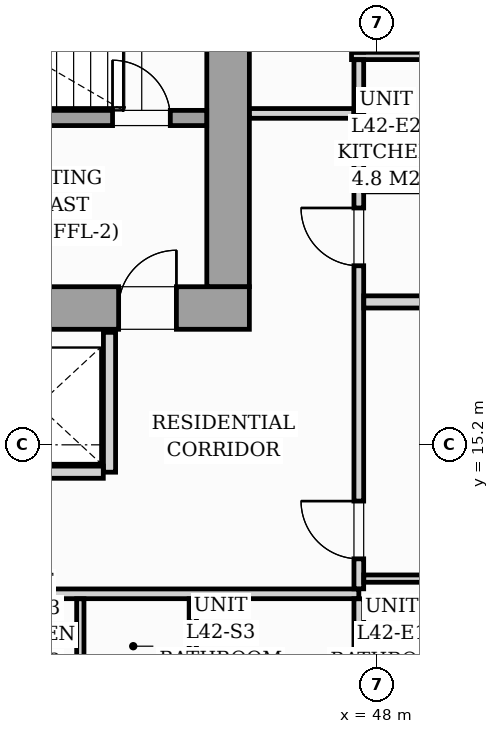
"""IFC4 building model, lengths in metres.
Left out: names, types, materials, properties, quantities, classifications, styles, units other than length and angle.
Written with IfcOpenShell. Run it as: python <this file> out.ifc"""

import sys

from ifc_helpers import new_model, si_unit, direction, frame, frame_2d, origin, origin_2d, place, context, subcontext, project, spatial, rectangle, i_section, extrude, source, transform, mapped, element, fill, save


model = new_model("IFC4")
c1 = context("Model", 3, precision=1e-05, world=origin(), true_north=direction((0.0, 1.0)))
c2 = subcontext(c1, "Body", "Model", "MODEL_VIEW")
j1 = project(units=[si_unit("LENGTHUNIT", "METRE"), si_unit("PLANEANGLEUNIT", "RADIAN")], contexts=[c1])
p1 = place(None, origin())
s1 = spatial("IfcSite", under=j1, at=p1, CompositionType="ELEMENT")
p2 = place(p1, origin())
s2 = spatial("IfcBuilding", under=s1, at=p2, CompositionType="ELEMENT")
p3 = place(p2, frame((0.0, 0.0, 147.0)))
s3 = spatial("IfcBuildingStorey", under=s2, at=p3, CompositionType="ELEMENT", Elevation=147.0)
m1 = source(origin(), c2, "Body", "SweptSolid", [
    extrude(i_section(OverallWidth=0.421, OverallDepth=0.465, WebThickness=0.045, FlangeThickness=0.073, FilletRadius=0.018, at=origin_2d()), origin(), (0.0, 0.0, 1.0), 3.196),
])
p4 = place(p3, frame((45.6, 17.4, 0.002), z_axis=(0.0, 0.0, 1.0), x_axis=(1.0, 0.0, 0.0)))
e1 = element("IfcColumn", 1, at=p4, inside=s3, PredefinedType="PILASTER", context=c2, shape_type="MappedRepresentation", body=[
    mapped(m1, transform((0.0, 0.0, 0.0), scale=1.0)),
])
p5 = place(p3, frame((26.1, 17.45, 0.0), z_axis=(0.0, 0.0, 1.0), x_axis=(1.0, 0.0, 0.0)))
e2 = element("IfcWall", 2, at=p5, inside=s3, PredefinedType="SHEAR", context=c2, shape_type="SweptSolid", body=[
    extrude(rectangle(XDim=19.8, YDim=0.7, at=frame_2d((9.9, 0.0))), origin(), (0.0, 0.0, 1.0), 3.2),
])
p6 = place(p5, frame((1.05, 0.0, 0.0)))
e3 = element("IfcOpeningElement", 3, at=p6, cuts=e2, PredefinedType="OPENING", context=c2, shape_type="SweptSolid", body=[
    extrude(rectangle(XDim=0.95, YDim=2.06, at=frame_2d((0.475, 1.03))), frame((0.0, 0.36, 0.0), z_axis=(0.0, -1.0, 0.0), x_axis=(1.0, 0.0, 0.0)), (0.0, 0.0, 1.0), 0.72),
])
p7 = place(p5, frame((9.48, 0.0, 0.0)))
e4 = element("IfcOpeningElement", 4, at=p7, cuts=e2, PredefinedType="OPENING", context=c2, shape_type="SweptSolid", body=[
    extrude(rectangle(XDim=0.85, YDim=2.0, at=frame_2d((0.425, 1.0))), frame((0.0, 0.36, 0.0), z_axis=(0.0, -1.0, 0.0), x_axis=(1.0, 0.0, 0.0)), (0.0, 0.0, 1.0), 0.72),
])
p8 = place(p5, frame((17.65, 0.0, 0.0)))
e5 = element("IfcOpeningElement", 5, at=p8, cuts=e2, PredefinedType="OPENING", context=c2, shape_type="SweptSolid", body=[
    extrude(rectangle(XDim=0.95, YDim=2.06, at=frame_2d((0.475, 1.03))), frame((0.0, 0.36, 0.0), z_axis=(0.0, -1.0, 0.0), x_axis=(1.0, 0.0, 0.0)), (0.0, 0.0, 1.0), 0.72),
])
p9 = place(p3, frame((45.55, 17.802, 0.0), z_axis=(0.0, 0.0, 1.0), x_axis=(0.0, 1.0, 0.0)))
e6 = element("IfcWall", 6, at=p9, inside=s3, PredefinedType="SHEAR", context=c2, shape_type="SweptSolid", body=[
    extrude(rectangle(XDim=5.796, YDim=0.7, at=frame_2d((2.898, 0.0))), origin(), (0.0, 0.0, 1.0), 3.2),
])
p10 = place(p3, frame((37.05, 20.575, 0.0), z_axis=(0.0, 0.0, 1.0), x_axis=(1.0, 0.0, 0.0)))
e7 = element("IfcWall", 7, at=p10, inside=s3, PredefinedType="SOLIDWALL", context=c2, shape_type="SweptSolid", body=[
    extrude(rectangle(XDim=8.148, YDim=0.25, at=frame_2d((4.074, 0.0))), origin(), (0.0, 0.0, 1.0), 3.2),
])
p11 = place(p10, frame((6.6, 0.0, 0.0)))
e8 = element("IfcOpeningElement", 8, at=p11, cuts=e7, PredefinedType="OPENING", context=c2, shape_type="SweptSolid", body=[
    extrude(rectangle(XDim=0.95, YDim=2.06, at=frame_2d((0.475, 1.03))), frame((0.0, 0.135, 0.0), z_axis=(0.0, -1.0, 0.0), x_axis=(1.0, 0.0, 0.0)), (0.0, 0.0, 1.0), 0.27),
])
p12 = place(p3, frame((43.6, 14.75, 0.0), z_axis=(0.0, 0.0, 1.0), x_axis=(0.0, 1.0, 0.0)))
e9 = element("IfcWall", 9, at=p12, inside=s3, PredefinedType="PARTITIONING", context=c2, shape_type="SweptSolid", body=[
    extrude(rectangle(XDim=2.3, YDim=0.2, at=frame_2d((1.15, 0.0))), origin(), (0.0, 0.0, 1.0), 2.94),
])
p13 = place(p3, frame((41.352, 14.75, 0.0), z_axis=(0.0, 0.0, 1.0), x_axis=(1.0, 0.0, 0.0)))
e10 = element("IfcWall", 10, at=p13, inside=s3, PredefinedType="PARTITIONING", context=c2, shape_type="SweptSolid", body=[
    extrude(rectangle(XDim=2.146, YDim=0.2, at=frame_2d((1.073, 0.0))), origin(), (0.0, 0.0, 1.0), 2.94),
])
p14 = place(p3, frame((22.05, 12.75, 0.0), z_axis=(0.0, 0.0, 1.0), x_axis=(1.0, 0.0, 0.0)))
e11 = element("IfcWall", 11, at=p14, inside=s3, PredefinedType="PARTITIONING", context=c2, shape_type="SweptSolid", body=[
    extrude(rectangle(XDim=25.65, YDim=0.16, at=frame_2d((12.825, 0.0))), origin(), (0.0, 0.0, 1.0), 2.94),
])
p15 = place(p14, frame((1.312, 0.0, 0.0)))
e12 = element("IfcOpeningElement", 12, at=p15, cuts=e11, PredefinedType="OPENING", context=c2, shape_type="SweptSolid", body=[
    extrude(rectangle(XDim=0.95, YDim=2.06, at=frame_2d((0.475, 1.03))), frame((0.0, 0.09, 0.0), z_axis=(0.0, -1.0, 0.0), x_axis=(1.0, 0.0, 0.0)), (0.0, 0.0, 1.0), 0.18),
])
p16 = place(p14, frame((8.281, 0.0, 0.0)))
e13 = element("IfcOpeningElement", 13, at=p16, cuts=e11, PredefinedType="OPENING", context=c2, shape_type="SweptSolid", body=[
    extrude(rectangle(XDim=0.95, YDim=2.06, at=frame_2d((0.475, 1.03))), frame((0.0, 0.09, 0.0), z_axis=(0.0, -1.0, 0.0), x_axis=(1.0, 0.0, 0.0)), (0.0, 0.0, 1.0), 0.18),
])
p17 = place(p14, frame((17.268, 0.0, 0.0)))
e14 = element("IfcOpeningElement", 14, at=p17, cuts=e11, PredefinedType="OPENING", context=c2, shape_type="SweptSolid", body=[
    extrude(rectangle(XDim=0.95, YDim=2.06, at=frame_2d((0.475, 1.03))), frame((0.0, 0.09, 0.0), z_axis=(0.0, -1.0, 0.0), x_axis=(1.0, 0.0, 0.0)), (0.0, 0.0, 1.0), 0.18),
])
p18 = place(p3, frame((47.7, 5.783, 0.0), z_axis=(0.0, 0.0, 1.0), x_axis=(0.0, 1.0, 0.0)))
e15 = element("IfcWall", 15, at=p18, inside=s3, PredefinedType="PARTITIONING", context=c2, shape_type="SweptSolid", body=[
    extrude(rectangle(XDim=6.885, YDim=0.16, at=frame_2d((3.442, 0.0))), origin(), (0.0, 0.0, 1.0), 2.94),
])
p19 = place(p3, frame((47.7, 12.832, 0.0), z_axis=(0.0, 0.0, 1.0), x_axis=(0.0, 1.0, 0.0)))
e16 = element("IfcWall", 16, at=p19, inside=s3, PredefinedType="PARTITIONING", context=c2, shape_type="SweptSolid", body=[
    extrude(rectangle(XDim=7.818, YDim=0.16, at=frame_2d((3.909, 0.0))), origin(), (0.0, 0.0, 1.0), 2.94),
])
p20 = place(p19, frame((0.493, 0.0, 0.0)))
e17 = element("IfcOpeningElement", 17, at=p20, cuts=e16, PredefinedType="OPENING", context=c2, shape_type="SweptSolid", body=[
    extrude(rectangle(XDim=0.95, YDim=2.06, at=frame_2d((0.475, 1.03))), frame((0.0, 0.09, 0.0), z_axis=(0.0, -1.0, 0.0), x_axis=(1.0, 0.0, 0.0)), (0.0, 0.0, 1.0), 0.18),
])
p21 = place(p19, frame((5.313, 0.0, 0.0)))
e18 = element("IfcOpeningElement", 18, at=p21, cuts=e16, PredefinedType="OPENING", context=c2, shape_type="SweptSolid", body=[
    extrude(rectangle(XDim=0.95, YDim=2.06, at=frame_2d((0.475, 1.03))), frame((0.0, 0.09, 0.0), z_axis=(0.0, -1.0, 0.0), x_axis=(1.0, 0.0, 0.0)), (0.0, 0.0, 1.0), 0.18),
])
p22 = place(p3, frame((45.902, 20.65, 0.0), z_axis=(0.0, 0.0, 1.0), x_axis=(1.0, 0.0, 0.0)))
e19 = element("IfcWall", 19, at=p22, inside=s3, PredefinedType="PARTITIONING", context=c2, shape_type="SweptSolid", body=[
    extrude(rectangle(XDim=1.716, YDim=0.16, at=frame_2d((0.858, 0.0))), origin(), (0.0, 0.0, 1.0), 2.94),
])
p23 = place(p3, frame((44.97, 6.046, 0.0), z_axis=(0.0, 0.0, 1.0), x_axis=(0.0, 1.0, 0.0)))
e20 = element("IfcWall", 20, at=p23, inside=s3, PredefinedType="PARTITIONING", context=c2, shape_type="SweptSolid", body=[
    extrude(rectangle(XDim=6.622, YDim=0.12, at=frame_2d((3.311, 0.0))), origin(), (0.0, 0.0, 1.0), 2.94),
])
p24 = place(p23, frame((3.354, 0.0, 0.0)))
e21 = element("IfcOpeningElement", 21, at=p24, cuts=e20, PredefinedType="OPENING", context=c2, shape_type="SweptSolid", body=[
    extrude(rectangle(XDim=0.9, YDim=2.05, at=frame_2d((0.45, 1.025))), frame((0.0, 0.07, 0.0), z_axis=(0.0, -1.0, 0.0), x_axis=(1.0, 0.0, 0.0)), (0.0, 0.0, 1.0), 0.14),
])
p25 = place(p3, frame((43.12, 10.562, 0.0), z_axis=(0.0, 0.0, 1.0), x_axis=(0.0, 1.0, 0.0)))
e22 = element("IfcWall", 22, at=p25, inside=s3, PredefinedType="PARTITIONING", context=c2, shape_type="SweptSolid", body=[
    extrude(rectangle(XDim=2.106, YDim=0.12, at=frame_2d((1.053, 0.0))), origin(), (0.0, 0.0, 1.0), 2.94),
])
p26 = place(p3, frame((47.782, 17.55, 0.0), z_axis=(0.0, 0.0, 1.0), x_axis=(1.0, 0.0, 0.0)))
e23 = element("IfcWall", 23, at=p26, inside=s3, PredefinedType="PARTITIONING", context=c2, shape_type="SweptSolid", body=[
    extrude(rectangle(XDim=11.934, YDim=0.2, at=frame_2d((5.967, 0.0))), origin(), (0.0, 0.0, 1.0), 2.94),
])
p27 = place(p3, frame((47.782, 13.0, 0.0), z_axis=(0.0, 0.0, 1.0), x_axis=(1.0, 0.0, 0.0)))
e24 = element("IfcWall", 24, at=p27, inside=s3, PredefinedType="PARTITIONING", context=c2, shape_type="SweptSolid", body=[
    extrude(rectangle(XDim=2.256, YDim=0.12, at=frame_2d((1.128, 0.0))), origin(), (0.0, 0.0, 1.0), 2.94),
])
p28 = place(p3, frame((47.58, 21.595, 0.0), z_axis=(0.0, 0.0, 1.0), x_axis=(1.0, 0.0, 0.0)))
e25 = element("IfcWall", 25, at=p28, inside=s3, PredefinedType="PARTITIONING", context=c2, shape_type="SweptSolid", body=[
    extrude(rectangle(XDim=2.458, YDim=0.12, at=frame_2d((1.229, 0.0))), origin(), (0.0, 0.0, 1.0), 2.94),
])
p29 = place(p3, frame((47.782, 19.42, 0.0), z_axis=(0.0, 0.0, 1.0), x_axis=(1.0, 0.0, 0.0)))
e26 = element("IfcWall", 26, at=p29, inside=s3, PredefinedType="PARTITIONING", context=c2, shape_type="SweptSolid", body=[
    extrude(rectangle(XDim=2.256, YDim=0.12, at=frame_2d((1.128, 0.0))), origin(), (0.0, 0.0, 1.0), 2.94),
])
p30 = place(p3, frame((47.7, 20.65, 0.0), z_axis=(0.0, 0.0, 1.0), x_axis=(0.0, 1.0, 0.0)))
e27 = element("IfcWall", 27, at=p30, inside=s3, PredefinedType="PARTITIONING", context=c2, shape_type="SweptSolid", body=[
    extrude(rectangle(XDim=0.883, YDim=0.16, at=frame_2d((0.441, 0.0))), origin(), (0.0, 0.0, 1.0), 2.94),
])
m2 = source(origin(), c2, "Body", "SweptSolid", [
    extrude(rectangle(XDim=0.95, YDim=2.06, at=frame_2d((0.475, 1.03))), frame((0.0, 0.025, 0.0), z_axis=(0.0, -1.0, 0.0), x_axis=(1.0, 0.0, 0.0)), (0.0, 0.0, 1.0), 0.05),
])
p31 = place(p8, origin())
e28 = element("IfcDoor", 28, at=p31, inside=s3, OperationType="SINGLE_SWING_RIGHT", PredefinedType="DOOR", context=c2, shape_type="MappedRepresentation", body=[
    mapped(m2, transform((0.0, 0.0, 0.0), scale=1.0)),
])
fill(e5, e28)
p32 = place(p11, origin())
e29 = element("IfcDoor", 29, at=p32, inside=s3, OperationType="SINGLE_SWING_LEFT", PredefinedType="DOOR", context=c2, shape_type="MappedRepresentation", body=[
    mapped(m2, transform((0.0, 0.0, 0.0), scale=1.0)),
])
fill(e8, e29)
m3 = source(origin(), c2, "Body", "SweptSolid", [
    extrude(rectangle(XDim=0.95, YDim=2.06, at=frame_2d((0.475, 1.03))), frame((0.0, 0.025, 0.0), z_axis=(0.0, -1.0, 0.0), x_axis=(1.0, 0.0, 0.0)), (0.0, 0.0, 1.0), 0.05),
])
p33 = place(p20, origin())
e30 = element("IfcDoor", 30, at=p33, inside=s3, OperationType="SINGLE_SWING_RIGHT", PredefinedType="DOOR", context=c2, shape_type="MappedRepresentation", body=[
    mapped(m3, transform((0.0, 0.0, 0.0), scale=1.0)),
])
fill(e17, e30)
p34 = place(p21, origin())
e31 = element("IfcDoor", 31, at=p34, inside=s3, OperationType="SINGLE_SWING_RIGHT", PredefinedType="DOOR", context=c2, shape_type="MappedRepresentation", body=[
    mapped(m3, transform((0.0, 0.0, 0.0), scale=1.0)),
])
fill(e18, e31)
save(model, sys.argv[1])
